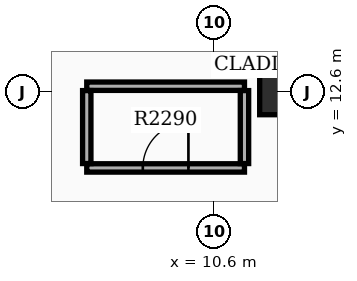
"""IFC4 building model, lengths in metres.
Left out: names, types, materials, properties, quantities, classifications, styles, units other than length and angle.
Written with IfcOpenShell. Run it as: python <this file> out.ifc"""

import sys

from ifc_helpers import new_model, si_unit, direction, frame, frame_2d, origin, origin_2d, place, context, subcontext, project, spatial, rectangle, extrude, element, fill, save


model = new_model("IFC4")
c1 = context("Model", 3, precision=1e-05, world=origin(), true_north=direction((0.0, 1.0)))
c2 = subcontext(c1, "Body", "Model", "MODEL_VIEW")
j1 = project(units=[si_unit("LENGTHUNIT", "METRE"), si_unit("PLANEANGLEUNIT", "RADIAN")], contexts=[c1])
p1 = place(None, origin())
s1 = spatial("IfcSite", under=j1, at=p1, CompositionType="ELEMENT")
p2 = place(p1, origin())
s2 = spatial("IfcBuilding", under=s1, at=p2, CompositionType="ELEMENT")
p3 = place(p2, frame((0.0, 0.0, 143.7)))
s3 = spatial("IfcBuildingStorey", under=s2, at=p3, CompositionType="ELEMENT", Elevation=143.7)
p4 = place(p3, frame((12.4, 12.6, 0.0), z_axis=(0.0, 0.0, 1.0), x_axis=(1.0, 0.0, 0.0)))
e1 = element("IfcColumn", 1, at=p4, inside=s3, PredefinedType="COLUMN", context=c2, shape_type="SweptSolid", body=[
    extrude(rectangle(XDim=1.2, YDim=1.2, at=origin_2d()), origin(), (0.0, 0.0, 1.0), 5.1),
])
p5 = place(p3, frame((7.25, 10.6, 0.0), z_axis=(0.0, 0.0, 1.0), x_axis=(1.0, 0.0, 0.0)))
e2 = element("IfcWall", 2, at=p5, inside=s3, PredefinedType="PARTITIONING", context=c2, shape_type="SweptSolid", body=[
    extrude(rectangle(XDim=4.15, YDim=0.22, at=frame_2d((2.075, 0.0))), origin(), (0.0, 0.0, 1.0), 3.97),
])
p6 = place(p5, frame((1.475, 0.0, 0.0)))
e3 = element("IfcOpeningElement", 3, at=p6, cuts=e2, PredefinedType="OPENING", context=c2, shape_type="SweptSolid", body=[
    extrude(rectangle(XDim=1.2, YDim=2.15, at=frame_2d((0.6, 1.075))), frame((0.0, 0.12, 0.0), z_axis=(0.0, -1.0, 0.0), x_axis=(1.0, 0.0, 0.0)), (0.0, 0.0, 1.0), 0.24),
])
p7 = place(p3, frame((7.25, 12.75, 0.0), z_axis=(0.0, 0.0, 1.0), x_axis=(1.0, 0.0, 0.0)))
e4 = element("IfcWall", 4, at=p7, inside=s3, PredefinedType="PARTITIONING", context=c2, shape_type="SweptSolid", body=[
    extrude(rectangle(XDim=4.15, YDim=0.22, at=frame_2d((2.075, 0.0))), origin(), (0.0, 0.0, 1.0), 3.97),
])
for number, where, z_axis, x_axis in (
    (5, (7.25, 10.715, 0.0), (0.0, 0.0, 1.0), (0.0, 1.0, 0.0)),
    (6, (11.4, 10.715, 0.0), (0.0, 0.0, 1.0), (0.0, 1.0, 0.0)),
):
    element("IfcWall", number, at=place(p3, frame(where, z_axis=z_axis, x_axis=x_axis)), inside=s3, PredefinedType="PARTITIONING", context=c2, shape_type="SweptSolid", body=[
        extrude(rectangle(XDim=1.92, YDim=0.22, at=frame_2d((0.96, 0.0))), origin(), (0.0, 0.0, 1.0), 3.97),
    ])
p8 = place(p6, origin())
e7 = element("IfcDoor", 7, at=p8, inside=s3, OperationType="SINGLE_SWING_RIGHT", PredefinedType="DOOR", context=c2, shape_type="SweptSolid", body=[
    extrude(rectangle(XDim=1.2, YDim=2.15, at=frame_2d((0.6, 1.075))), frame((0.0, 0.025, 0.0), z_axis=(0.0, -1.0, 0.0), x_axis=(1.0, 0.0, 0.0)), (0.0, 0.0, 1.0), 0.05),
])
fill(e3, e7)
save(model, sys.argv[1])
